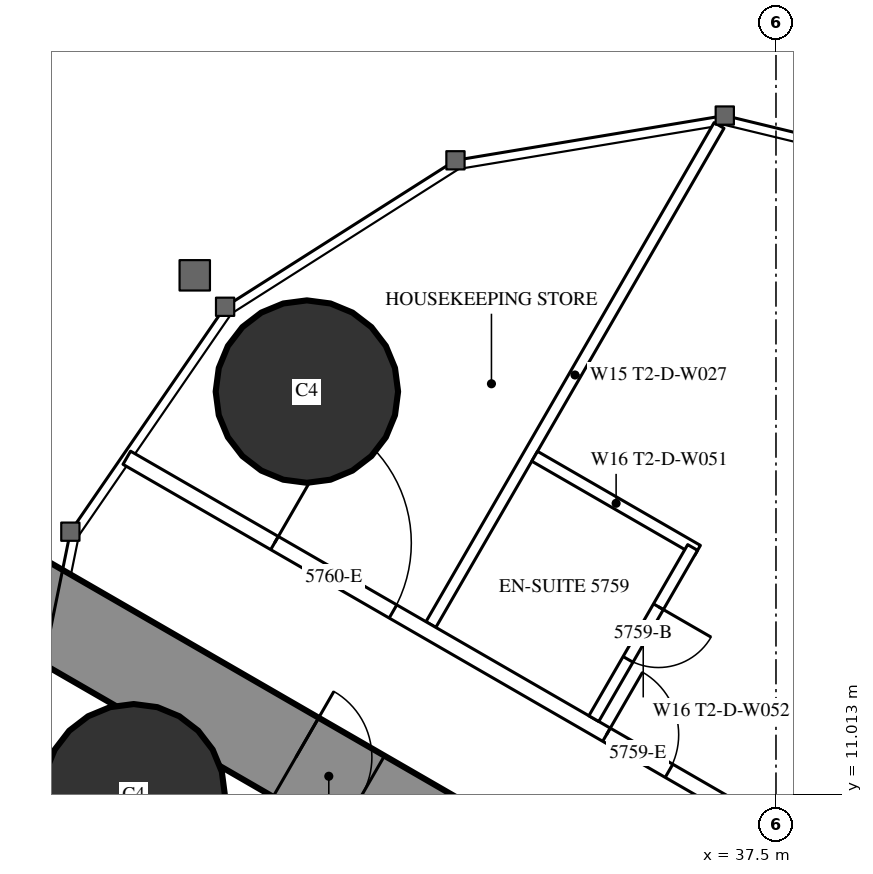
"""IFC4 building model, lengths in metres.
Left out: names, types, materials, properties, quantities, classifications, styles, units other than length and angle.
Written with IfcOpenShell. Run it as: python <this file> out.ifc"""

import sys

from ifc_helpers import new_model, si_unit, direction, frame, frame_2d, origin, origin_2d, place, context, subcontext, project, spatial, rectangle, circle, extrude, element, fill, save


model = new_model("IFC4")
c1 = context("Model", 3, precision=1e-05, world=origin(), true_north=direction((0.0, 1.0)))
c2 = subcontext(c1, "Body", "Model", "MODEL_VIEW")
j1 = project(units=[si_unit("LENGTHUNIT", "METRE"), si_unit("PLANEANGLEUNIT", "RADIAN")], contexts=[c1])
p1 = place(None, origin())
s1 = spatial("IfcSite", under=j1, at=p1, CompositionType="ELEMENT")
p2 = place(p1, origin())
s2 = spatial("IfcBuilding", under=s1, at=p2, CompositionType="ELEMENT")
p3 = place(p2, frame((0.0, 0.0, 215.3)))
s3 = spatial("IfcBuildingStorey", under=s2, at=p3, CompositionType="ELEMENT", Elevation=215.3)
for number, where, z_axis, x_axis in (
    (1, (31.328, 16.311, 0.0), (0.0, 0.0, 1.0), (1.0, 0.0, 0.0)),
    (2, (29.05, 11.0, 0.0), (0.0, 0.0, 1.0), (1.0, 0.0, 0.0)),
):
    element("IfcColumn", number, at=place(p3, frame(where, z_axis=z_axis, x_axis=x_axis)), inside=s3, PredefinedType="COLUMN", context=c2, shape_type="SweptSolid", body=[
        extrude(circle(Radius=1.2, at=origin_2d()), origin(), (0.0, 0.0, 1.0), 3.6),
    ])
p4 = place(p3, frame((27.2, 13.8, 0.0), z_axis=(0.0, 0.0, 1.0), x_axis=(0.866024515034, -0.500001539357, 0.0)))
e3 = element("IfcWall", 3, at=p4, inside=s3, PredefinedType="SHEAR", context=c2, shape_type="SweptSolid", body=[
    extrude(rectangle(XDim=26.907, YDim=1.2, at=frame_2d((13.454, 0.0))), origin(), (0.0, 0.0, 1.0), 3.6),
])
p5 = place(p4, frame((4.6, 0.0, 0.0)))
e4 = element("IfcOpeningElement", 4, at=p5, cuts=e3, PredefinedType="OPENING", context=c2, shape_type="SweptSolid", body=[
    extrude(rectangle(XDim=1.0, YDim=2.2, at=frame_2d((0.5, 1.1))), frame((0.0, 0.61, 0.0), z_axis=(0.0, -1.0, 0.0), x_axis=(1.0, 0.0, 0.0)), (0.0, 0.0, 1.0), 1.22),
])
p6 = place(p4, frame((13.395, 0.0, 0.0)))
e5 = element("IfcOpeningElement", 5, at=p6, cuts=e3, PredefinedType="OPENING", context=c2, shape_type="SweptSolid", body=[
    extrude(rectangle(XDim=1.8, YDim=2.2, at=frame_2d((0.9, 1.1))), frame((0.0, 0.61, 0.0), z_axis=(0.0, -1.0, 0.0), x_axis=(1.0, 0.0, 0.0)), (0.0, 0.0, 1.0), 1.22),
])
p7 = place(p3, frame((32.96, 13.246, 0.0), z_axis=(0.0, 0.0, 1.0), x_axis=(0.500000236886, 0.866025267018, 0.0)))
e6 = element("IfcWall", 6, at=p7, inside=s3, PredefinedType="PARTITIONING", context=c2, shape_type="SweptSolid", body=[
    extrude(rectangle(XDim=7.583, YDim=0.15, at=frame_2d((3.791, 0.0))), origin(), (0.0, 0.0, 1.0), 3.35),
])
p8 = place(p3, frame((28.959, 15.44, 0.0), z_axis=(0.0, 0.0, 1.0), x_axis=(0.866028936079, -0.499993881836, 0.0)))
e7 = element("IfcWall", 7, at=p8, inside=s3, PredefinedType="PARTITIONING", context=c2, shape_type="SweptSolid", body=[
    extrude(rectangle(XDim=20.503, YDim=0.2, at=frame_2d((10.251, 0.0))), origin(), (0.0, 0.0, 1.0), 3.35),
])
p9 = place(p8, frame((16.603, 0.0, 0.0)))
e8 = element("IfcOpeningElement", 8, at=p9, cuts=e7, PredefinedType="OPENING", context=c2, shape_type="SweptSolid", body=[
    extrude(rectangle(XDim=0.95, YDim=2.2, at=frame_2d((0.475, 1.1))), frame((0.0, 0.11, 0.0), z_axis=(0.0, -1.0, 0.0), x_axis=(1.0, 0.0, 0.0)), (0.0, 0.0, 1.0), 0.22),
])
p10 = place(p8, frame((7.287, 0.0, 0.0)))
e9 = element("IfcOpeningElement", 9, at=p10, cuts=e7, PredefinedType="OPENING", context=c2, shape_type="SweptSolid", body=[
    extrude(rectangle(XDim=0.95, YDim=2.2, at=frame_2d((0.475, 1.1))), frame((0.0, 0.11, 0.0), z_axis=(0.0, -1.0, 0.0), x_axis=(1.0, 0.0, 0.0)), (0.0, 0.0, 1.0), 0.22),
])
p11 = place(p8, frame((2.244, 0.0, 0.0)))
e10 = element("IfcOpeningElement", 10, at=p11, cuts=e7, PredefinedType="OPENING", context=c2, shape_type="SweptSolid", body=[
    extrude(rectangle(XDim=1.8, YDim=2.2, at=frame_2d((0.9, 1.1))), frame((0.0, 0.11, 0.0), z_axis=(0.0, -1.0, 0.0), x_axis=(1.0, 0.0, 0.0)), (0.0, 0.0, 1.0), 0.22),
])
p12 = place(p3, frame((34.325, 15.46, 0.0), z_axis=(0.0, 0.0, 1.0), x_axis=(0.866031185235, -0.4999899861, 0.0)))
e11 = element("IfcWall", 11, at=p12, inside=s3, PredefinedType="PARTITIONING", context=c2, shape_type="SweptSolid", body=[
    extrude(rectangle(XDim=2.475, YDim=0.15, at=frame_2d((1.238, 0.0))), origin(), (0.0, 0.0, 1.0), 3.35),
])
p13 = place(p3, frame((35.104, 12.008, 0.0), z_axis=(0.0, 0.0, 1.0), x_axis=(0.500047596559, 0.865997922154, 0.0)))
e12 = element("IfcWall", 12, at=p13, inside=s3, PredefinedType="PARTITIONING", context=c2, shape_type="SweptSolid", body=[
    extrude(rectangle(XDim=2.6, YDim=0.15, at=frame_2d((1.3, 0.0))), origin(), (0.0, 0.0, 1.0), 3.35),
])
p14 = place(p13, frame((0.9, 0.0, 0.0)))
e13 = element("IfcOpeningElement", 13, at=p14, cuts=e12, PredefinedType="OPENING", context=c2, shape_type="SweptSolid", body=[
    extrude(rectangle(XDim=0.8, YDim=2.2, at=frame_2d((0.4, 1.1))), frame((0.0, 0.085, 0.0), z_axis=(0.0, -1.0, 0.0), x_axis=(1.0, 0.0, 0.0)), (0.0, 0.0, 1.0), 0.17),
])
p15 = place(p14, origin())
e14 = element("IfcDoor", 14, at=p15, inside=s3, OperationType="SINGLE_SWING_RIGHT", PredefinedType="DOOR", context=c2, shape_type="SweptSolid", body=[
    extrude(rectangle(XDim=0.8, YDim=2.2, at=frame_2d((0.4, 1.1))), frame((0.0, 0.025, 0.0), z_axis=(0.0, -1.0, 0.0), x_axis=(1.0, 0.0, 0.0)), (0.0, 0.0, 1.0), 0.05),
])
fill(e13, e14)
p16 = place(p10, origin())
e15 = element("IfcDoor", 15, at=p16, inside=s3, OperationType="SINGLE_SWING_LEFT", PredefinedType="DOOR", context=c2, shape_type="SweptSolid", body=[
    extrude(rectangle(XDim=0.95, YDim=2.2, at=frame_2d((0.475, 1.1))), frame((0.0, 0.025, 0.0), z_axis=(0.0, -1.0, 0.0), x_axis=(1.0, 0.0, 0.0)), (0.0, 0.0, 1.0), 0.05),
])
fill(e9, e15)
p17 = place(p11, origin())
e16 = element("IfcDoor", 16, at=p17, inside=s3, OperationType="DOUBLE_DOOR_SINGLE_SWING", PredefinedType="DOOR", context=c2, shape_type="SweptSolid", body=[
    extrude(rectangle(XDim=1.8, YDim=2.2, at=frame_2d((0.9, 1.1))), frame((0.0, 0.025, 0.0), z_axis=(0.0, -1.0, 0.0), x_axis=(1.0, 0.0, 0.0)), (0.0, 0.0, 1.0), 0.05),
])
fill(e10, e16)
p18 = place(p5, origin())
e17 = element("IfcDoor", 17, at=p18, inside=s3, OperationType="SINGLE_SWING_LEFT", PredefinedType="DOOR", context=c2, shape_type="SweptSolid", body=[
    extrude(rectangle(XDim=1.0, YDim=2.2, at=frame_2d((0.5, 1.1))), frame((0.0, 0.025, 0.0), z_axis=(0.0, -1.0, 0.0), x_axis=(1.0, 0.0, 0.0)), (0.0, 0.0, 1.0), 0.05),
])
fill(e4, e17)
save(model, sys.argv[1])
